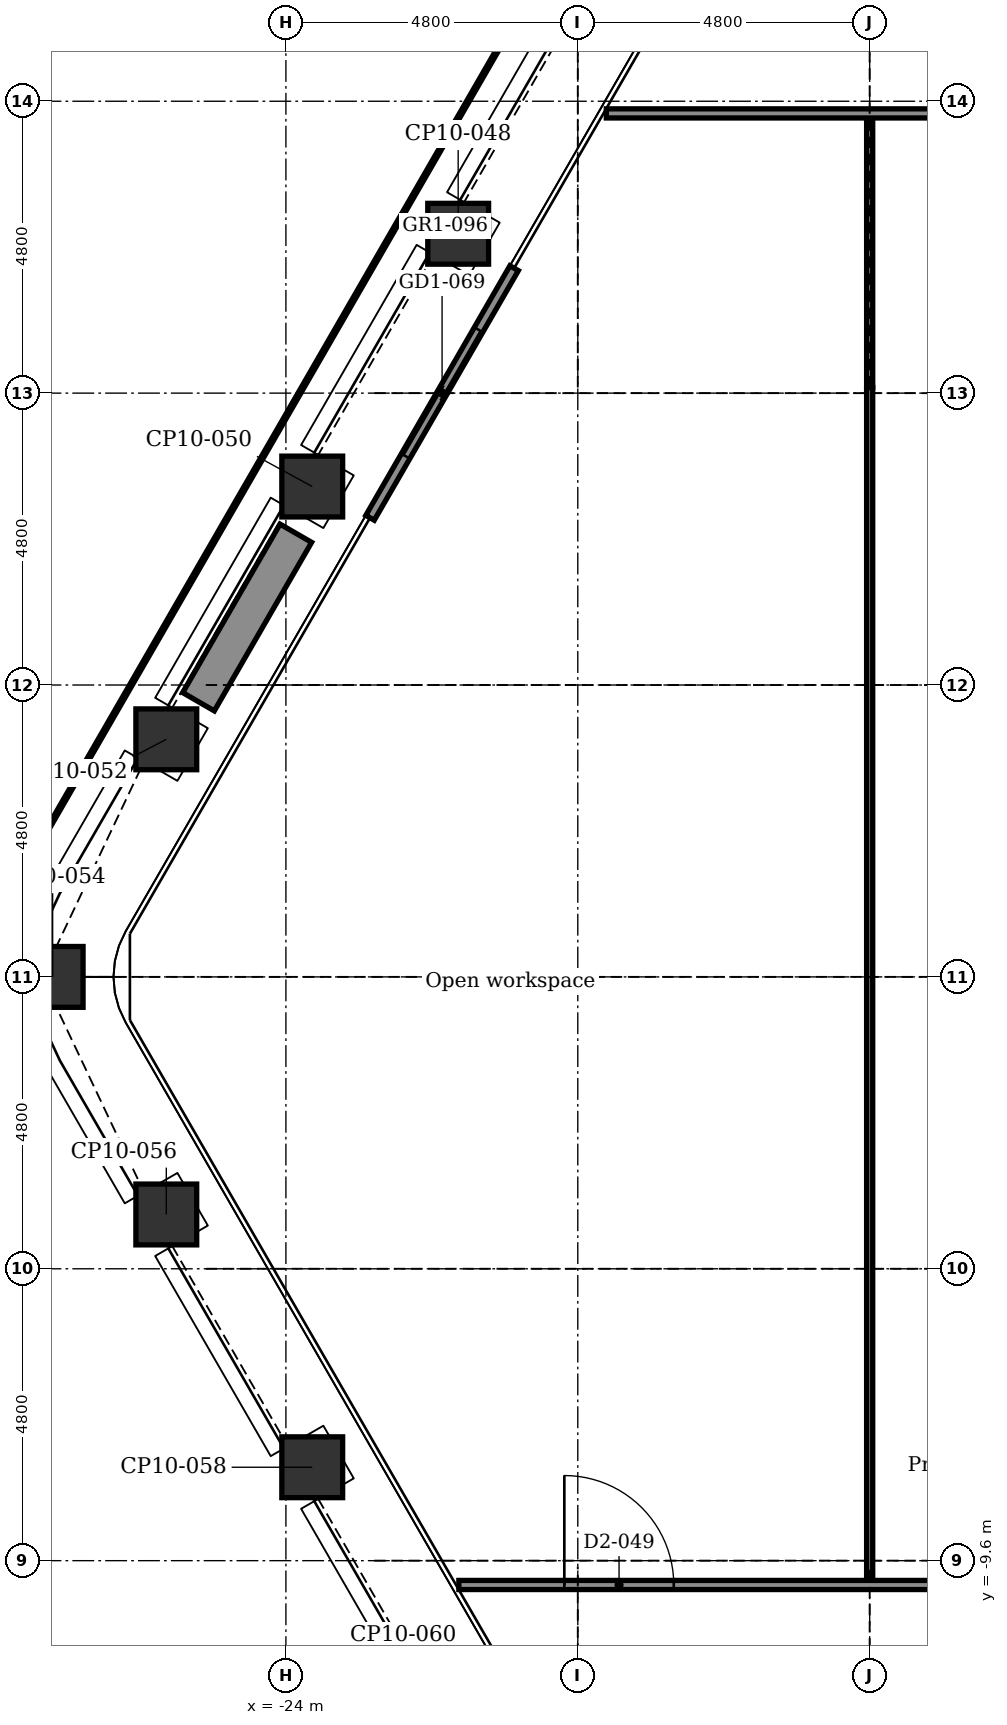
"""IFC4 building model, lengths in metres.
Left out: names, types, materials, properties, quantities, classifications, styles, units other than length and angle.
Written with IfcOpenShell. Run it as: python <this file> out.ifc"""

import sys

from ifc_helpers import new_model, si_unit, direction, frame, frame_2d, origin, origin_2d, place, context, subcontext, project, spatial, rectangle, extrude, element, fill, save


model = new_model("IFC4")
c1 = context("Model", 3, precision=1e-05, world=origin(), true_north=direction((0.0, 1.0)))
c2 = subcontext(c1, "Body", "Model", "MODEL_VIEW")
j1 = project(units=[si_unit("LENGTHUNIT", "METRE"), si_unit("PLANEANGLEUNIT", "RADIAN")], contexts=[c1])
p1 = place(None, origin())
s1 = spatial("IfcSite", under=j1, at=p1, CompositionType="ELEMENT")
p2 = place(p1, origin())
s2 = spatial("IfcBuilding", under=s1, at=p2, CompositionType="ELEMENT")
p3 = place(p2, frame((0.0, 0.0, 166.1)))
s3 = spatial("IfcBuildingStorey", under=s2, at=p3, CompositionType="ELEMENT", Elevation=166.1)
for number, where, z_axis, x_axis in (
    (1, (-23.567, -8.064, -0.15), (0.0, 0.0, 1.0), (0.866, 0.5, 0.0)),
    (2, (-25.967, -3.907, -0.15), (0.0, 0.0, 1.0), (0.866, 0.5, 0.0)),
    (3, (-27.836, 0.0, -0.15), (0.0, 0.0, 1.0), (1.0, 0.0, 0.0)),
    (4, (-25.967, 3.907, -0.15), (0.0, 0.0, 1.0), (0.5, 0.866, 0.0)),
    (5, (-23.567, 8.064, -0.15), (0.0, 0.0, 1.0), (0.5, 0.866, 0.0)),
    (6, (-21.167, 12.221, -0.15), (0.0, 0.0, 1.0), (0.5, 0.866, 0.0)),
):
    element("IfcColumn", number, at=place(p3, frame(where, z_axis=z_axis, x_axis=x_axis)), inside=s3, PredefinedType="COLUMN", context=c2, shape_type="SweptSolid", body=[
        extrude(rectangle(XDim=1.0, YDim=1.0, at=origin_2d()), origin(), (0.0, 0.0, 1.0), 3.9),
    ])
p4 = place(p3, frame((-22.617, 7.55, 0.0), z_axis=(0.0, 0.0, 1.0), x_axis=(0.5000167099, 0.866015756104, 0.0)))
e7 = element("IfcWall", 7, at=p4, inside=s3, PredefinedType="PARTITIONING", context=c2, shape_type="SweptSolid", body=[
    extrude(rectangle(XDim=4.74, YDim=0.16, at=frame_2d((2.37, 0.0))), origin(), (0.0, 0.0, 1.0), 3.75),
])
p5 = place(p4, frame((1.17, 0.0, 0.0)))
e8 = element("IfcOpeningElement", 8, at=p5, cuts=e7, PredefinedType="OPENING", context=c2, shape_type="SweptSolid", body=[
    extrude(rectangle(XDim=2.4, YDim=2.4, at=frame_2d((1.2, 1.2))), frame((0.0, 0.09, 0.0), z_axis=(0.0, -1.0, 0.0), x_axis=(1.0, 0.0, 0.0)), (0.0, 0.0, 1.0), 0.18),
])
p6 = place(p3, frame((-25.437, 4.525, 0.0), z_axis=(0.0, 0.0, 1.0), x_axis=(0.499938187974, 0.866061088033, 0.0)))
e9 = element("IfcWall", 9, at=p6, inside=s3, PredefinedType="USERDEFINED", context=c2, shape_type="SweptSolid", body=[
    extrude(rectangle(XDim=3.2, YDim=0.6, at=frame_2d((1.6, 0.0))), origin(), (0.0, 0.0, 1.0), 0.7),
])
p7 = place(p3, frame((-14.4, -10.0, 0.0), z_axis=(0.0, 0.0, 1.0), x_axis=(0.0, 1.0, 0.0)))
e10 = element("IfcWall", 10, at=p7, inside=s3, PredefinedType="PARTITIONING", context=c2, shape_type="SweptSolid", body=[
    extrude(rectangle(XDim=19.694, YDim=0.1, at=frame_2d((9.847, 0.0))), origin(), (0.0, 0.0, 1.0), 3.75),
])
p8 = place(p3, frame((-14.4, 9.694, 0.0), z_axis=(0.0, 0.0, 1.0), x_axis=(0.0, 1.0, 0.0)))
e11 = element("IfcWall", 11, at=p8, inside=s3, PredefinedType="PARTITIONING", context=c2, shape_type="SweptSolid", body=[
    extrude(rectangle(XDim=4.506, YDim=0.1, at=frame_2d((2.253, 0.0))), origin(), (0.0, 0.0, 1.0), 3.066),
])
p9 = place(p3, frame((-21.156, -10.0, 0.0), z_axis=(0.0, 0.0, 1.0), x_axis=(1.0, 0.0, 0.0)))
e12 = element("IfcWall", 12, at=p9, inside=s3, PredefinedType="PARTITIONING", context=c2, shape_type="SweptSolid", body=[
    extrude(rectangle(XDim=10.156, YDim=0.15, at=frame_2d((5.078, 0.0))), origin(), (0.0, 0.0, 1.0), 3.75),
])
p10 = place(p9, frame((1.735, 0.0, 0.0)))
e13 = element("IfcOpeningElement", 13, at=p10, cuts=e12, PredefinedType="OPENING", context=c2, shape_type="SweptSolid", body=[
    extrude(rectangle(XDim=1.8, YDim=2.1, at=frame_2d((0.9, 1.05))), frame((0.0, 0.085, 0.0), z_axis=(0.0, -1.0, 0.0), x_axis=(1.0, 0.0, 0.0)), (0.0, 0.0, 1.0), 0.17),
])
p11 = place(p3, frame((-18.731, 14.2, 0.0), z_axis=(0.0, 0.0, 1.0), x_axis=(1.0, 0.0, 0.0)))
e14 = element("IfcWall", 14, at=p11, inside=s3, PredefinedType="PARTITIONING", context=c2, shape_type="SweptSolid", body=[
    extrude(rectangle(XDim=22.331, YDim=0.15, at=frame_2d((11.166, 0.0))), origin(), (0.0, 0.0, 1.0), 3.75),
])
p12 = place(p11, frame((10.381, 0.0, 0.0)))
e15 = element("IfcOpeningElement", 15, at=p12, cuts=e14, PredefinedType="OPENING", context=c2, shape_type="SweptSolid", body=[
    extrude(rectangle(XDim=0.9, YDim=2.1, at=frame_2d((0.45, 1.05))), frame((0.0, 0.085, 0.0), z_axis=(0.0, -1.0, 0.0), x_axis=(1.0, 0.0, 0.0)), (0.0, 0.0, 1.0), 0.17),
])
p13 = place(p11, frame((15.881, 0.0, 0.0)))
e16 = element("IfcOpeningElement", 16, at=p13, cuts=e14, PredefinedType="OPENING", context=c2, shape_type="SweptSolid", body=[
    extrude(rectangle(XDim=0.9, YDim=2.1, at=frame_2d((0.45, 1.05))), frame((0.0, 0.085, 0.0), z_axis=(0.0, -1.0, 0.0), x_axis=(1.0, 0.0, 0.0)), (0.0, 0.0, 1.0), 0.17),
])
p14 = place(p11, frame((5.756, 0.0, 0.0)))
e17 = element("IfcOpeningElement", 17, at=p14, cuts=e14, PredefinedType="OPENING", context=c2, shape_type="SweptSolid", body=[
    extrude(rectangle(XDim=1.0, YDim=2.1, at=frame_2d((0.5, 1.05))), frame((0.0, 0.085, 0.0), z_axis=(0.0, -1.0, 0.0), x_axis=(1.0, 0.0, 0.0)), (0.0, 0.0, 1.0), 0.17),
])
p15 = place(p5, origin())
e18 = element("IfcDoor", 18, at=p15, inside=s3, OperationType="DOUBLE_DOOR_SLIDING", PredefinedType="DOOR", context=c2, shape_type="SweptSolid", body=[
    extrude(rectangle(XDim=2.4, YDim=2.4, at=frame_2d((1.2, 1.2))), frame((0.0, 0.025, 0.0), z_axis=(0.0, -1.0, 0.0), x_axis=(1.0, 0.0, 0.0)), (0.0, 0.0, 1.0), 0.05),
])
fill(e8, e18)
p16 = place(p10, origin())
e19 = element("IfcDoor", 19, at=p16, inside=s3, OperationType="SINGLE_SWING_LEFT", PredefinedType="DOOR", context=c2, shape_type="SweptSolid", body=[
    extrude(rectangle(XDim=1.8, YDim=2.1, at=frame_2d((0.9, 1.05))), frame((0.0, 0.025, 0.0), z_axis=(0.0, -1.0, 0.0), x_axis=(1.0, 0.0, 0.0)), (0.0, 0.0, 1.0), 0.05),
])
fill(e13, e19)
save(model, sys.argv[1])
